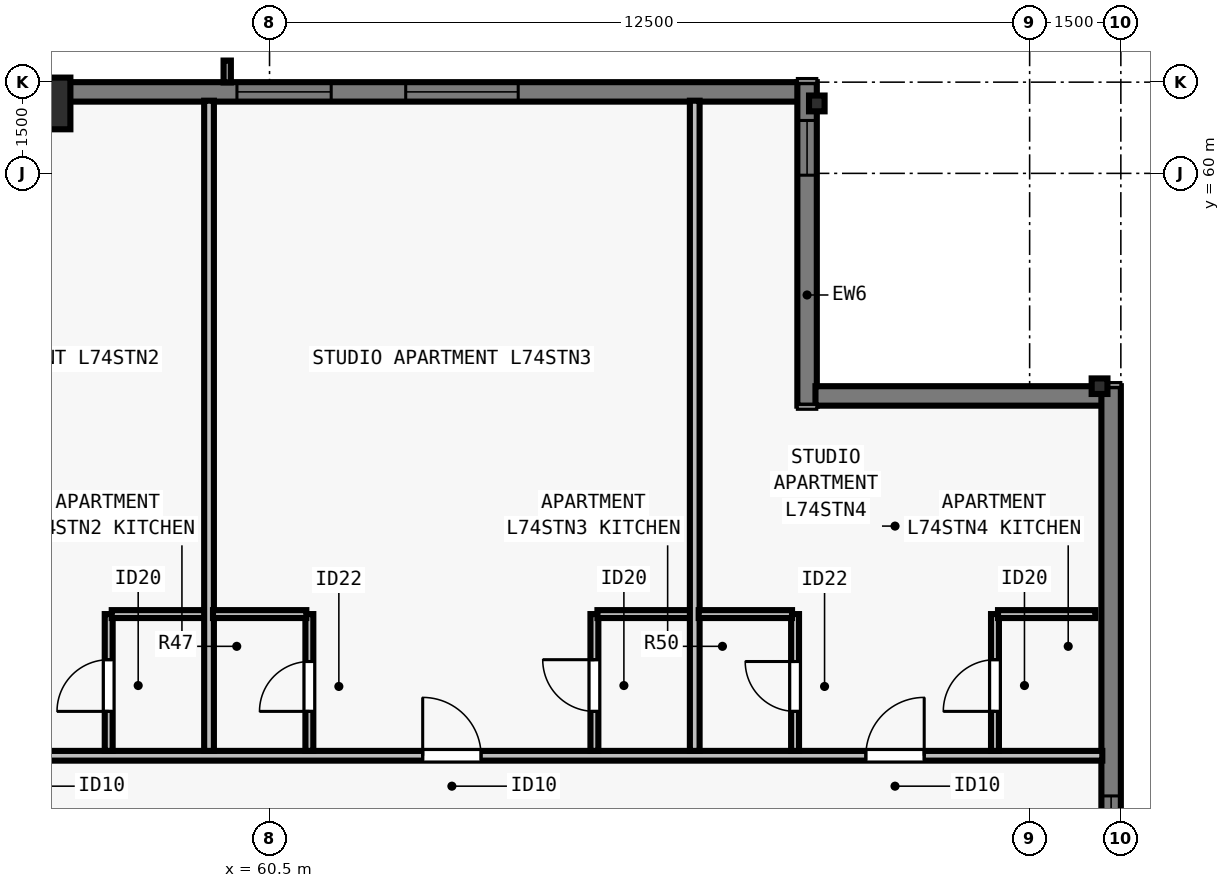
"""IFC4 building model, lengths in metres.
Left out: names, types, materials, properties, quantities, classifications, styles, units other than length and angle.
Written with IfcOpenShell. Run it as: python <this file> out.ifc"""

import sys

from ifc_helpers import new_model, si_unit, direction, frame, frame_2d, origin, origin_2d, place, context, subcontext, project, spatial, rectangle, i_section, extrude, element, fill, save


model = new_model("IFC4")
c1 = context("Model", 3, precision=1e-05, world=origin(), true_north=direction((0.0, 1.0)))
c2 = subcontext(c1, "Body", "Model", "MODEL_VIEW")
j1 = project(units=[si_unit("LENGTHUNIT", "METRE"), si_unit("PLANEANGLEUNIT", "RADIAN")], contexts=[c1])
p1 = place(None, origin())
s1 = spatial("IfcSite", under=j1, at=p1, CompositionType="ELEMENT")
p2 = place(p1, origin())
s2 = spatial("IfcBuilding", under=s1, at=p2, CompositionType="ELEMENT")
p3 = place(p2, frame((0.0, 0.0, 269.0)))
s3 = spatial("IfcBuildingStorey", under=s2, at=p3, CompositionType="ELEMENT", Elevation=269.0)
for number, where, z_axis, x_axis in (
    (1, (74.15, 56.5, 0.0), (0.0, 0.0, 1.0), (0.0, 1.0, 0.0)),
    (2, (69.5, 61.15, 0.0), (0.0, 0.0, 1.0), (1.0, 0.0, 0.0)),
):
    element("IfcColumn", number, at=place(p3, frame(where, z_axis=z_axis, x_axis=x_axis)), inside=s3, PredefinedType="COLUMN", context=c2, shape_type="SweptSolid", body=[
        extrude(i_section(OverallWidth=0.256, OverallDepth=0.26, WebThickness=0.01, FlangeThickness=0.017, FilletRadius=0.013, at=origin_2d()), origin(), (0.0, 0.0, 1.0), 3.5),
    ])
p4 = place(p3, frame((56.8, 61.15, 0.0), z_axis=(0.0, 0.0, 1.0), x_axis=(1.0, 0.0, 0.0)))
e3 = element("IfcColumn", 3, at=p4, inside=s3, PredefinedType="COLUMN", context=c2, shape_type="SweptSolid", body=[
    extrude(rectangle(XDim=0.85, YDim=0.85, at=origin_2d()), origin(), (0.0, 0.0, 1.0), 3.5),
])
p5 = place(p3, frame((34.5, 61.34, 0.0), z_axis=(0.0, 0.0, 1.0), x_axis=(1.0, 0.0, 0.0)))
e4 = element("IfcWall", 4, at=p5, inside=s3, PredefinedType="SOLIDWALL", context=c2, shape_type="SweptSolid", body=[
    extrude(rectangle(XDim=34.702, YDim=0.32, at=frame_2d((17.351, 0.0))), origin(), (0.0, 0.0, 1.0), 3.29),
])
p6 = place(p5, frame((4.763, 0.0, 0.8)))
e5 = element("IfcOpeningElement", 5, at=p6, cuts=e4, PredefinedType="OPENING", context=c2, shape_type="SweptSolid", body=[
    extrude(rectangle(XDim=1.55, YDim=1.678, at=frame_2d((0.775, 0.839))), frame((0.0, 0.17, 0.0), z_axis=(0.0, -1.0, 0.0), x_axis=(1.0, 0.0, 0.0)), (0.0, 0.0, 1.0), 0.34),
])
p7 = place(p5, frame((7.988, 0.0, 0.8)))
e6 = element("IfcOpeningElement", 6, at=p7, cuts=e4, PredefinedType="OPENING", context=c2, shape_type="SweptSolid", body=[
    extrude(rectangle(XDim=1.85, YDim=1.678, at=frame_2d((0.925, 0.839))), frame((0.0, 0.17, 0.0), z_axis=(0.0, -1.0, 0.0), x_axis=(1.0, 0.0, 0.0)), (0.0, 0.0, 1.0), 0.34),
])
p8 = place(p5, frame((14.738, 0.0, 0.8)))
e7 = element("IfcOpeningElement", 7, at=p8, cuts=e4, PredefinedType="OPENING", context=c2, shape_type="SweptSolid", body=[
    extrude(rectangle(XDim=1.85, YDim=1.678, at=frame_2d((0.925, 0.839))), frame((0.0, 0.17, 0.0), z_axis=(0.0, -1.0, 0.0), x_axis=(1.0, 0.0, 0.0)), (0.0, 0.0, 1.0), 0.34),
])
p9 = place(p5, frame((19.114, 0.0, 0.8)))
e8 = element("IfcOpeningElement", 8, at=p9, cuts=e4, PredefinedType="OPENING", context=c2, shape_type="SweptSolid", body=[
    extrude(rectangle(XDim=1.55, YDim=1.678, at=frame_2d((0.775, 0.839))), frame((0.0, 0.17, 0.0), z_axis=(0.0, -1.0, 0.0), x_axis=(1.0, 0.0, 0.0)), (0.0, 0.0, 1.0), 0.34),
])
p10 = place(p5, frame((25.464, 0.0, 0.8)))
e9 = element("IfcOpeningElement", 9, at=p10, cuts=e4, PredefinedType="OPENING", context=c2, shape_type="SweptSolid", body=[
    extrude(rectangle(XDim=1.55, YDim=1.678, at=frame_2d((0.775, 0.839))), frame((0.0, 0.17, 0.0), z_axis=(0.0, -1.0, 0.0), x_axis=(1.0, 0.0, 0.0)), (0.0, 0.0, 1.0), 0.34),
])
p11 = place(p5, frame((28.24, 0.0, 0.8)))
e10 = element("IfcOpeningElement", 10, at=p11, cuts=e4, PredefinedType="OPENING", context=c2, shape_type="SweptSolid", body=[
    extrude(rectangle(XDim=1.85, YDim=1.678, at=frame_2d((0.925, 0.839))), frame((0.0, 0.17, 0.0), z_axis=(0.0, -1.0, 0.0), x_axis=(1.0, 0.0, 0.0)), (0.0, 0.0, 1.0), 0.34),
])
p12 = place(p3, frame((69.34, 61.5, 0.0), z_axis=(0.0, 0.0, 1.0), x_axis=(0.0, -1.0, 0.0)))
e11 = element("IfcWall", 11, at=p12, inside=s3, PredefinedType="SOLIDWALL", context=c2, shape_type="SweptSolid", body=[
    extrude(rectangle(XDim=5.32, YDim=0.32, at=frame_2d((2.66, 0.0))), origin(), (0.0, 0.0, 1.0), 3.29),
])
p13 = place(p12, frame((0.63, 0.0, 0.8)))
e12 = element("IfcOpeningElement", 12, at=p13, cuts=e11, PredefinedType="OPENING", context=c2, shape_type="SweptSolid", body=[
    extrude(rectangle(XDim=0.9, YDim=1.678, at=frame_2d((0.45, 0.839))), frame((0.0, 0.17, 0.0), z_axis=(0.0, -1.0, 0.0), x_axis=(1.0, 0.0, 0.0)), (0.0, 0.0, 1.0), 0.34),
])
p14 = place(p3, frame((69.478, 56.34, 0.0), z_axis=(0.0, 0.0, 1.0), x_axis=(1.0, 0.0, 0.0)))
e13 = element("IfcWall", 13, at=p14, inside=s3, PredefinedType="SOLIDWALL", context=c2, shape_type="SweptSolid", body=[
    extrude(rectangle(XDim=4.724, YDim=0.32, at=frame_2d((2.362, 0.0))), origin(), (0.0, 0.0, 1.0), 3.29),
])
p15 = place(p3, frame((74.34, 56.5, 0.0), z_axis=(0.0, 0.0, 1.0), x_axis=(0.0, -1.0, 0.0)))
e14 = element("IfcWall", 14, at=p15, inside=s3, PredefinedType="SOLIDWALL", context=c2, shape_type="SweptSolid", body=[
    extrude(rectangle(XDim=34.702, YDim=0.32, at=frame_2d((17.351, 0.0))), origin(), (0.0, 0.0, 1.0), 3.29),
])
p16 = place(p15, frame((6.738, 0.0, 0.8)))
e15 = element("IfcOpeningElement", 15, at=p16, cuts=e14, PredefinedType="OPENING", context=c2, shape_type="SweptSolid", body=[
    extrude(rectangle(XDim=1.85, YDim=1.678, at=frame_2d((0.925, 0.839))), frame((0.0, 0.17, 0.0), z_axis=(0.0, -1.0, 0.0), x_axis=(1.0, 0.0, 0.0)), (0.0, 0.0, 1.0), 0.34),
])
p17 = place(p15, frame((10.263, 0.0, 0.8)))
e16 = element("IfcOpeningElement", 16, at=p17, cuts=e14, PredefinedType="OPENING", context=c2, shape_type="SweptSolid", body=[
    extrude(rectangle(XDim=1.55, YDim=1.678, at=frame_2d((0.775, 0.839))), frame((0.0, 0.17, 0.0), z_axis=(0.0, -1.0, 0.0), x_axis=(1.0, 0.0, 0.0)), (0.0, 0.0, 1.0), 0.34),
])
p18 = place(p15, frame((13.488, 0.0, 0.8)))
e17 = element("IfcOpeningElement", 17, at=p18, cuts=e14, PredefinedType="OPENING", context=c2, shape_type="SweptSolid", body=[
    extrude(rectangle(XDim=1.85, YDim=1.678, at=frame_2d((0.925, 0.839))), frame((0.0, 0.17, 0.0), z_axis=(0.0, -1.0, 0.0), x_axis=(1.0, 0.0, 0.0)), (0.0, 0.0, 1.0), 0.34),
])
p19 = place(p15, frame((18.264, 0.0, 0.8)))
e18 = element("IfcOpeningElement", 18, at=p19, cuts=e14, PredefinedType="OPENING", context=c2, shape_type="SweptSolid", body=[
    extrude(rectangle(XDim=1.55, YDim=1.678, at=frame_2d((0.775, 0.839))), frame((0.0, 0.17, 0.0), z_axis=(0.0, -1.0, 0.0), x_axis=(1.0, 0.0, 0.0)), (0.0, 0.0, 1.0), 0.34),
])
p20 = place(p15, frame((24.164, 0.0, 0.8)))
e19 = element("IfcOpeningElement", 19, at=p20, cuts=e14, PredefinedType="OPENING", context=c2, shape_type="SweptSolid", body=[
    extrude(rectangle(XDim=1.55, YDim=1.678, at=frame_2d((0.775, 0.839))), frame((0.0, 0.17, 0.0), z_axis=(0.0, -1.0, 0.0), x_axis=(1.0, 0.0, 0.0)), (0.0, 0.0, 1.0), 0.34),
])
p21 = place(p3, frame((29.805, 50.423, 0.0), z_axis=(0.0, 0.0, 1.0), x_axis=(1.0, 0.0, 0.0)))
e20 = element("IfcWall", 20, at=p21, inside=s3, PredefinedType="PARTITIONING", context=c2, shape_type="SweptSolid", body=[
    extrude(rectangle(XDim=44.39, YDim=0.16, at=frame_2d((22.195, 0.0))), origin(), (0.0, 0.0, 1.0), 2.958),
])
p22 = place(p21, frame((5.465, 0.0, 0.0)))
e21 = element("IfcOpeningElement", 21, at=p22, cuts=e20, PredefinedType="OPENING", context=c2, shape_type="SweptSolid", body=[
    extrude(rectangle(XDim=0.96, YDim=2.12, at=frame_2d((0.48, 1.06))), frame((0.0, 0.09, 0.0), z_axis=(0.0, -1.0, 0.0), x_axis=(1.0, 0.0, 0.0)), (0.0, 0.0, 1.0), 0.18),
])
p23 = place(p21, frame((19.179, 0.0, 0.0)))
e22 = element("IfcOpeningElement", 22, at=p23, cuts=e20, PredefinedType="OPENING", context=c2, shape_type="SweptSolid", body=[
    extrude(rectangle(XDim=0.96, YDim=2.18, at=frame_2d((0.48, 1.09))), frame((0.0, 0.09, 0.0), z_axis=(0.0, -1.0, 0.0), x_axis=(1.0, 0.0, 0.0)), (0.0, 0.0, 1.0), 0.18),
])
p24 = place(p21, frame((26.106, 0.0, 0.0)))
e23 = element("IfcOpeningElement", 23, at=p24, cuts=e20, PredefinedType="OPENING", context=c2, shape_type="SweptSolid", body=[
    extrude(rectangle(XDim=0.96, YDim=2.18, at=frame_2d((0.48, 1.09))), frame((0.0, 0.09, 0.0), z_axis=(0.0, -1.0, 0.0), x_axis=(1.0, 0.0, 0.0)), (0.0, 0.0, 1.0), 0.18),
])
p25 = place(p21, frame((33.214, 0.0, 0.0)))
e24 = element("IfcOpeningElement", 24, at=p25, cuts=e20, PredefinedType="OPENING", context=c2, shape_type="SweptSolid", body=[
    extrude(rectangle(XDim=0.96, YDim=2.18, at=frame_2d((0.48, 1.09))), frame((0.0, 0.09, 0.0), z_axis=(0.0, -1.0, 0.0), x_axis=(1.0, 0.0, 0.0)), (0.0, 0.0, 1.0), 0.18),
])
p26 = place(p21, frame((40.501, 0.0, 0.0)))
e25 = element("IfcOpeningElement", 25, at=p26, cuts=e20, PredefinedType="OPENING", context=c2, shape_type="SweptSolid", body=[
    extrude(rectangle(XDim=0.96, YDim=2.18, at=frame_2d((0.48, 1.09))), frame((0.0, 0.09, 0.0), z_axis=(0.0, -1.0, 0.0), x_axis=(1.0, 0.0, 0.0)), (0.0, 0.0, 1.0), 0.18),
])
p27 = place(p3, frame((57.855, 50.502, 0.0), z_axis=(0.0, 0.0, 1.0), x_axis=(0.0, 1.0, 0.0)))
e26 = element("IfcWall", 26, at=p27, inside=s3, PredefinedType="PLUMBINGWALL", context=c2, shape_type="SweptSolid", body=[
    extrude(rectangle(XDim=2.25, YDim=0.13, at=frame_2d((1.125, 0.0))), origin(), (0.0, 0.0, 1.0), 3.29),
])
p28 = place(p27, frame((0.65, 0.0, 0.0)))
e27 = element("IfcOpeningElement", 27, at=p28, cuts=e26, PredefinedType="OPENING", context=c2, shape_type="SweptSolid", body=[
    extrude(rectangle(XDim=0.85, YDim=2.1, at=frame_2d((0.425, 1.05))), frame((0.0, 0.075, 0.0), z_axis=(0.0, -1.0, 0.0), x_axis=(1.0, 0.0, 0.0)), (0.0, 0.0, 1.0), 0.15),
])
p29 = place(p3, frame((57.905, 52.752, 0.0), z_axis=(0.0, 0.0, 1.0), x_axis=(1.0, 0.0, 0.0)))
e28 = element("IfcWall", 28, at=p29, inside=s3, PredefinedType="PLUMBINGWALL", context=c2, shape_type="SweptSolid", body=[
    extrude(rectangle(XDim=1.6, YDim=0.13, at=frame_2d((0.8, 0.0))), origin(), (0.0, 0.0, 1.0), 3.29),
])
p30 = place(p3, frame((59.505, 50.502, 0.0), z_axis=(0.0, 0.0, 1.0), x_axis=(0.0, 1.0, 0.0)))
e29 = element("IfcWall", 29, at=p30, inside=s3, PredefinedType="PARTITIONING", context=c2, shape_type="SweptSolid", body=[
    extrude(rectangle(XDim=10.693, YDim=0.16, at=frame_2d((5.346, 0.0))), origin(), (0.0, 0.0, 1.0), 3.29),
])
p31 = place(p3, frame((61.155, 50.502, 0.0), z_axis=(0.0, 0.0, 1.0), x_axis=(0.0, 1.0, 0.0)))
e30 = element("IfcWall", 30, at=p31, inside=s3, PredefinedType="PLUMBINGWALL", context=c2, shape_type="SweptSolid", body=[
    extrude(rectangle(XDim=2.25, YDim=0.13, at=frame_2d((1.125, 0.0))), origin(), (0.0, 0.0, 1.0), 3.29),
])
p32 = place(p31, frame((0.65, 0.0, 0.0)))
e31 = element("IfcOpeningElement", 31, at=p32, cuts=e30, PredefinedType="OPENING", context=c2, shape_type="SweptSolid", body=[
    extrude(rectangle(XDim=0.82, YDim=2.1, at=frame_2d((0.41, 1.05))), frame((0.0, 0.075, 0.0), z_axis=(0.0, -1.0, 0.0), x_axis=(1.0, 0.0, 0.0)), (0.0, 0.0, 1.0), 0.15),
])
p33 = place(p3, frame((59.57, 52.752, 0.0), z_axis=(0.0, 0.0, 1.0), x_axis=(1.0, 0.0, 0.0)))
e32 = element("IfcWall", 32, at=p33, inside=s3, PredefinedType="PLUMBINGWALL", context=c2, shape_type="SweptSolid", body=[
    extrude(rectangle(XDim=1.535, YDim=0.13, at=frame_2d((0.768, 0.0))), origin(), (0.0, 0.0, 1.0), 3.29),
])
p34 = place(p3, frame((65.843, 50.502, 0.0), z_axis=(0.0, 0.0, 1.0), x_axis=(0.0, 1.0, 0.0)))
e33 = element("IfcWall", 33, at=p34, inside=s3, PredefinedType="PLUMBINGWALL", context=c2, shape_type="SweptSolid", body=[
    extrude(rectangle(XDim=2.25, YDim=0.13, at=frame_2d((1.125, 0.0))), origin(), (0.0, 0.0, 1.0), 3.29),
])
p35 = place(p34, frame((0.65, 0.0, 0.0)))
e34 = element("IfcOpeningElement", 34, at=p35, cuts=e33, PredefinedType="OPENING", context=c2, shape_type="SweptSolid", body=[
    extrude(rectangle(XDim=0.85, YDim=2.1, at=frame_2d((0.425, 1.05))), frame((0.0, 0.075, 0.0), z_axis=(0.0, -1.0, 0.0), x_axis=(1.0, 0.0, 0.0)), (0.0, 0.0, 1.0), 0.15),
])
p36 = place(p3, frame((65.893, 52.752, 0.0), z_axis=(0.0, 0.0, 1.0), x_axis=(1.0, 0.0, 0.0)))
e35 = element("IfcWall", 35, at=p36, inside=s3, PredefinedType="PLUMBINGWALL", context=c2, shape_type="SweptSolid", body=[
    extrude(rectangle(XDim=1.6, YDim=0.13, at=frame_2d((0.8, 0.0))), origin(), (0.0, 0.0, 1.0), 3.29),
])
p37 = place(p3, frame((67.492, 50.502, 0.0), z_axis=(0.0, 0.0, 1.0), x_axis=(0.0, 1.0, 0.0)))
e36 = element("IfcWall", 36, at=p37, inside=s3, PredefinedType="PARTITIONING", context=c2, shape_type="SweptSolid", body=[
    extrude(rectangle(XDim=10.693, YDim=0.16, at=frame_2d((5.346, 0.0))), origin(), (0.0, 0.0, 1.0), 2.573),
])
p38 = place(p3, frame((69.143, 50.502, 0.0), z_axis=(0.0, 0.0, 1.0), x_axis=(0.0, 1.0, 0.0)))
e37 = element("IfcWall", 37, at=p38, inside=s3, PredefinedType="PLUMBINGWALL", context=c2, shape_type="SweptSolid", body=[
    extrude(rectangle(XDim=2.25, YDim=0.13, at=frame_2d((1.125, 0.0))), origin(), (0.0, 0.0, 1.0), 3.29),
])
p39 = place(p38, frame((0.65, 0.0, 0.0)))
e38 = element("IfcOpeningElement", 38, at=p39, cuts=e37, PredefinedType="OPENING", context=c2, shape_type="SweptSolid", body=[
    extrude(rectangle(XDim=0.82, YDim=2.1, at=frame_2d((0.41, 1.05))), frame((0.0, 0.075, 0.0), z_axis=(0.0, -1.0, 0.0), x_axis=(1.0, 0.0, 0.0)), (0.0, 0.0, 1.0), 0.15),
])
p40 = place(p3, frame((67.558, 52.752, 0.0), z_axis=(0.0, 0.0, 1.0), x_axis=(1.0, 0.0, 0.0)))
e39 = element("IfcWall", 39, at=p40, inside=s3, PredefinedType="PLUMBINGWALL", context=c2, shape_type="SweptSolid", body=[
    extrude(rectangle(XDim=1.535, YDim=0.13, at=frame_2d((0.768, 0.0))), origin(), (0.0, 0.0, 1.0), 2.958),
])
p41 = place(p3, frame((72.43, 50.502, 0.0), z_axis=(0.0, 0.0, 1.0), x_axis=(0.0, 1.0, 0.0)))
e40 = element("IfcWall", 40, at=p41, inside=s3, PredefinedType="PLUMBINGWALL", context=c2, shape_type="SweptSolid", body=[
    extrude(rectangle(XDim=2.25, YDim=0.13, at=frame_2d((1.125, 0.0))), origin(), (0.0, 0.0, 1.0), 3.29),
])
p42 = place(p41, frame((0.65, 0.0, 0.0)))
e41 = element("IfcOpeningElement", 41, at=p42, cuts=e40, PredefinedType="OPENING", context=c2, shape_type="SweptSolid", body=[
    extrude(rectangle(XDim=0.85, YDim=2.1, at=frame_2d((0.425, 1.05))), frame((0.0, 0.075, 0.0), z_axis=(0.0, -1.0, 0.0), x_axis=(1.0, 0.0, 0.0)), (0.0, 0.0, 1.0), 0.15),
])
p43 = place(p3, frame((72.48, 52.752, 0.0), z_axis=(0.0, 0.0, 1.0), x_axis=(1.0, 0.0, 0.0)))
e42 = element("IfcWall", 42, at=p43, inside=s3, PredefinedType="PLUMBINGWALL", context=c2, shape_type="SweptSolid", body=[
    extrude(rectangle(XDim=1.6, YDim=0.13, at=frame_2d((0.8, 0.0))), origin(), (0.0, 0.0, 1.0), 3.29),
])
p44 = place(p10, origin())
e43 = element("IfcWindow", 43, at=p44, inside=s3, PartitioningType="SINGLE_PANEL", PredefinedType="WINDOW", context=c2, shape_type="SweptSolid", body=[
    extrude(rectangle(XDim=1.55, YDim=1.678, at=frame_2d((0.775, 0.839))), frame((0.0, -0.05, 0.0), z_axis=(0.0, -1.0, 0.0), x_axis=(1.0, 0.0, 0.0)), (0.0, 0.0, 1.0), 0.06),
])
fill(e9, e43)
p45 = place(p11, origin())
e44 = element("IfcWindow", 44, at=p45, inside=s3, PartitioningType="SINGLE_PANEL", PredefinedType="WINDOW", context=c2, shape_type="SweptSolid", body=[
    extrude(rectangle(XDim=1.85, YDim=1.678, at=frame_2d((0.925, 0.839))), frame((0.0, -0.05, 0.0), z_axis=(0.0, -1.0, 0.0), x_axis=(1.0, 0.0, 0.0)), (0.0, 0.0, 1.0), 0.06),
])
fill(e10, e44)
p46 = place(p16, origin())
e45 = element("IfcWindow", 45, at=p46, inside=s3, PartitioningType="SINGLE_PANEL", PredefinedType="WINDOW", context=c2, shape_type="SweptSolid", body=[
    extrude(rectangle(XDim=1.85, YDim=1.678, at=frame_2d((0.925, 0.839))), frame((0.0, -0.05, 0.0), z_axis=(0.0, -1.0, 0.0), x_axis=(1.0, 0.0, 0.0)), (0.0, 0.0, 1.0), 0.06),
])
fill(e15, e45)
p47 = place(p13, origin())
e46 = element("IfcWindow", 46, at=p47, inside=s3, PartitioningType="SINGLE_PANEL", PredefinedType="WINDOW", context=c2, shape_type="SweptSolid", body=[
    extrude(rectangle(XDim=0.9, YDim=1.678, at=frame_2d((0.45, 0.839))), frame((0.0, -0.04, 0.0), z_axis=(0.0, -1.0, 0.0), x_axis=(1.0, 0.0, 0.0)), (0.0, 0.0, 1.0), 0.06),
])
fill(e12, e46)
p48 = place(p28, origin())
e47 = element("IfcDoor", 47, at=p48, inside=s3, OperationType="SINGLE_SWING_LEFT", PredefinedType="DOOR", context=c2, shape_type="SweptSolid", body=[
    extrude(rectangle(XDim=0.85, YDim=2.1, at=frame_2d((0.425, 1.05))), frame((0.0, 0.025, 0.0), z_axis=(0.0, -1.0, 0.0), x_axis=(1.0, 0.0, 0.0)), (0.0, 0.0, 1.0), 0.05),
])
fill(e27, e47)
p49 = place(p32, origin())
e48 = element("IfcDoor", 48, at=p49, inside=s3, OperationType="SINGLE_SWING_LEFT", PredefinedType="DOOR", context=c2, shape_type="SweptSolid", body=[
    extrude(rectangle(XDim=0.82, YDim=2.1, at=frame_2d((0.41, 1.05))), frame((0.0, 0.025, 0.0), z_axis=(0.0, -1.0, 0.0), x_axis=(1.0, 0.0, 0.0)), (0.0, 0.0, 1.0), 0.05),
])
fill(e31, e48)
p50 = place(p35, origin())
e49 = element("IfcDoor", 49, at=p50, inside=s3, OperationType="SINGLE_SWING_RIGHT", PredefinedType="DOOR", context=c2, shape_type="SweptSolid", body=[
    extrude(rectangle(XDim=0.85, YDim=2.1, at=frame_2d((0.425, 1.05))), frame((0.0, 0.025, 0.0), z_axis=(0.0, -1.0, 0.0), x_axis=(1.0, 0.0, 0.0)), (0.0, 0.0, 1.0), 0.05),
])
fill(e34, e49)
p51 = place(p25, origin())
e50 = element("IfcDoor", 50, at=p51, inside=s3, OperationType="SINGLE_SWING_LEFT", PredefinedType="DOOR", context=c2, shape_type="SweptSolid", body=[
    extrude(rectangle(XDim=0.96, YDim=2.18, at=frame_2d((0.48, 1.09))), frame((0.0, 0.025, 0.0), z_axis=(0.0, -1.0, 0.0), x_axis=(1.0, 0.0, 0.0)), (0.0, 0.0, 1.0), 0.05),
])
fill(e24, e50)
p52 = place(p39, origin())
e51 = element("IfcDoor", 51, at=p52, inside=s3, OperationType="SINGLE_SWING_RIGHT", PredefinedType="DOOR", context=c2, shape_type="SweptSolid", body=[
    extrude(rectangle(XDim=0.82, YDim=2.1, at=frame_2d((0.41, 1.05))), frame((0.0, 0.025, 0.0), z_axis=(0.0, -1.0, 0.0), x_axis=(1.0, 0.0, 0.0)), (0.0, 0.0, 1.0), 0.05),
])
fill(e38, e51)
p53 = place(p42, origin())
e52 = element("IfcDoor", 52, at=p53, inside=s3, OperationType="SINGLE_SWING_LEFT", PredefinedType="DOOR", context=c2, shape_type="SweptSolid", body=[
    extrude(rectangle(XDim=0.85, YDim=2.1, at=frame_2d((0.425, 1.05))), frame((0.0, 0.025, 0.0), z_axis=(0.0, -1.0, 0.0), x_axis=(1.0, 0.0, 0.0)), (0.0, 0.0, 1.0), 0.05),
])
fill(e41, e52)
p54 = place(p26, origin())
e53 = element("IfcDoor", 53, at=p54, inside=s3, OperationType="SINGLE_SWING_RIGHT", PredefinedType="DOOR", context=c2, shape_type="SweptSolid", body=[
    extrude(rectangle(XDim=0.96, YDim=2.18, at=frame_2d((0.48, 1.09))), frame((0.0, 0.025, 0.0), z_axis=(0.0, -1.0, 0.0), x_axis=(1.0, 0.0, 0.0)), (0.0, 0.0, 1.0), 0.05),
])
fill(e25, e53)
save(model, sys.argv[1])
